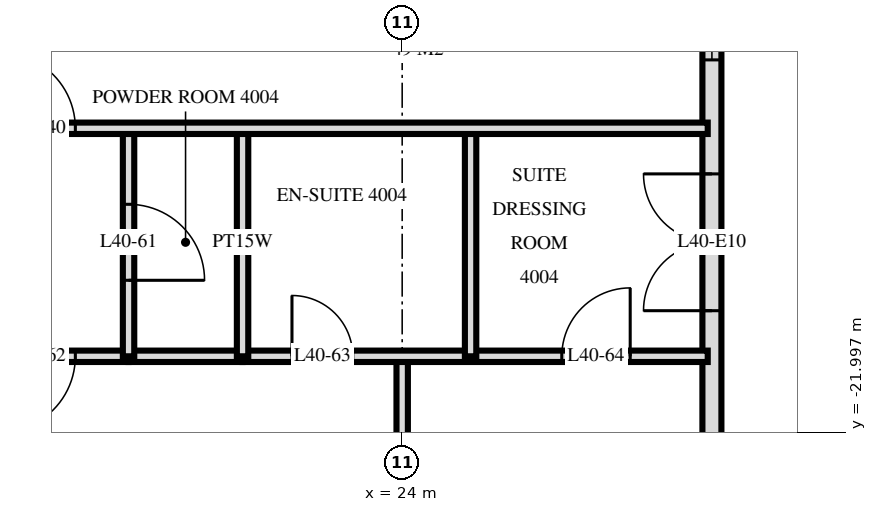
"""IFC4 building model, lengths in metres.
Left out: names, types, materials, properties, quantities, classifications, styles, units other than length and angle.
Written with IfcOpenShell. Run it as: python <this file> out.ifc"""

import sys

from ifc_helpers import new_model, si_unit, direction, frame, frame_2d, origin, place, context, subcontext, project, spatial, rectangle, extrude, element, fill, save


model = new_model("IFC4")
c1 = context("Model", 3, precision=1e-05, world=origin(), true_north=direction((0.0, 1.0)))
c2 = subcontext(c1, "Body", "Model", "MODEL_VIEW")
j1 = project(units=[si_unit("LENGTHUNIT", "METRE"), si_unit("PLANEANGLEUNIT", "RADIAN")], contexts=[c1])
p1 = place(None, origin())
s1 = spatial("IfcSite", under=j1, at=p1, CompositionType="ELEMENT")
p2 = place(p1, origin())
s2 = spatial("IfcBuilding", under=s1, at=p2, CompositionType="ELEMENT")
p3 = place(p2, frame((0.0, 0.0, 156.0)))
s3 = spatial("IfcBuildingStorey", under=s2, at=p3, CompositionType="ELEMENT", Elevation=156.0)
p4 = place(p3, frame((28.075, -29.275, 0.0), z_axis=(0.0, 0.0, 1.0), x_axis=(0.0, 1.0, 0.0)))
e1 = element("IfcWall", 1, at=p4, inside=s3, PredefinedType="SOLIDWALL", context=c2, shape_type="SweptSolid", body=[
    extrude(rectangle(XDim=25.951, YDim=0.25, at=frame_2d((12.975, 0.0))), origin(), (0.0, 0.0, 1.0), 3.32),
])
p5 = place(p4, frame((0.575, 0.0, 0.0)))
e2 = element("IfcOpeningElement", 2, at=p5, cuts=e1, PredefinedType="OPENING", context=c2, shape_type="SweptSolid", body=[
    extrude(rectangle(XDim=1.8, YDim=2.4, at=frame_2d((0.9, 1.2))), frame((0.0, 0.135, 0.0), z_axis=(0.0, -1.0, 0.0), x_axis=(1.0, 0.0, 0.0)), (0.0, 0.0, 1.0), 0.27),
])
p6 = place(p4, frame((3.325, 0.0, 0.3)))
e3 = element("IfcOpeningElement", 3, at=p6, cuts=e1, PredefinedType="OPENING", context=c2, shape_type="SweptSolid", body=[
    extrude(rectangle(XDim=1.8, YDim=2.1, at=frame_2d((0.9, 1.05))), frame((0.0, 0.135, 0.0), z_axis=(0.0, -1.0, 0.0), x_axis=(1.0, 0.0, 0.0)), (0.0, 0.0, 1.0), 0.27),
])
p7 = place(p4, frame((8.875, 0.0, 0.0)))
e4 = element("IfcOpeningElement", 4, at=p7, cuts=e1, PredefinedType="OPENING", context=c2, shape_type="SweptSolid", body=[
    extrude(rectangle(XDim=1.8, YDim=2.4, at=frame_2d((0.9, 1.2))), frame((0.0, 0.135, 0.0), z_axis=(0.0, -1.0, 0.0), x_axis=(1.0, 0.0, 0.0)), (0.0, 0.0, 1.0), 0.27),
])
p8 = place(p4, frame((12.175, 0.0, 0.3)))
e5 = element("IfcOpeningElement", 5, at=p8, cuts=e1, PredefinedType="OPENING", context=c2, shape_type="SweptSolid", body=[
    extrude(rectangle(XDim=1.2, YDim=2.1, at=frame_2d((0.6, 1.05))), frame((0.0, 0.135, 0.0), z_axis=(0.0, -1.0, 0.0), x_axis=(1.0, 0.0, 0.0)), (0.0, 0.0, 1.0), 0.27),
])
p9 = place(p4, frame((17.5, 0.0, 0.0)))
e6 = element("IfcOpeningElement", 6, at=p9, cuts=e1, PredefinedType="OPENING", context=c2, shape_type="SweptSolid", body=[
    extrude(rectangle(XDim=1.8, YDim=2.4, at=frame_2d((0.9, 1.2))), frame((0.0, 0.135, 0.0), z_axis=(0.0, -1.0, 0.0), x_axis=(1.0, 0.0, 0.0)), (0.0, 0.0, 1.0), 0.27),
])
p10 = place(p3, frame((24.9, -21.0, 0.0), z_axis=(0.0, 0.0, 1.0), x_axis=(0.0, 1.0, 0.0)))
e7 = element("IfcWall", 7, at=p10, inside=s3, PredefinedType="PARTITIONING", context=c2, shape_type="SweptSolid", body=[
    extrude(rectangle(XDim=3.0, YDim=0.15, at=frame_2d((1.5, 0.0))), origin(), (0.0, 0.0, 1.0), 3.32),
])
p11 = place(p3, frame((24.0, -33.557, 0.0), z_axis=(0.0, 0.0, 1.0), x_axis=(0.0, 1.0, 0.0)))
e8 = element("IfcWall", 8, at=p11, inside=s3, PredefinedType="PARTITIONING", context=c2, shape_type="SweptSolid", body=[
    extrude(rectangle(XDim=12.557, YDim=0.15, at=frame_2d((6.278, 0.0))), origin(), (0.0, 0.0, 1.0), 3.32),
])
p12 = place(p11, frame((5.737, 0.0, 0.0)))
e9 = element("IfcOpeningElement", 9, at=p12, cuts=e8, PredefinedType="OPENING", context=c2, shape_type="SweptSolid", body=[
    extrude(rectangle(XDim=0.9, YDim=2.1, at=frame_2d((0.45, 1.05))), frame((0.0, 0.085, 0.0), z_axis=(0.0, -1.0, 0.0), x_axis=(1.0, 0.0, 0.0)), (0.0, 0.0, 1.0), 0.17),
])
p13 = place(p3, frame((21.9, -21.0, 0.0), z_axis=(0.0, 0.0, 1.0), x_axis=(0.0, 1.0, 0.0)))
e10 = element("IfcWall", 10, at=p13, inside=s3, PredefinedType="PLUMBINGWALL", context=c2, shape_type="SweptSolid", body=[
    extrude(rectangle(XDim=3.0, YDim=0.15, at=frame_2d((1.5, 0.0))), origin(), (0.0, 0.0, 1.0), 3.32),
])
p14 = place(p3, frame((20.4, -21.0, 0.0), z_axis=(0.0, 0.0, 1.0), x_axis=(0.0, 1.0, 0.0)))
e11 = element("IfcWall", 11, at=p14, inside=s3, PredefinedType="PARTITIONING", context=c2, shape_type="SweptSolid", body=[
    extrude(rectangle(XDim=3.0, YDim=0.15, at=frame_2d((1.5, 0.0))), origin(), (0.0, 0.0, 1.0), 3.32),
])
p15 = place(p14, frame((1.0, 0.0, 0.0)))
e12 = element("IfcOpeningElement", 12, at=p15, cuts=e11, PredefinedType="OPENING", context=c2, shape_type="SweptSolid", body=[
    extrude(rectangle(XDim=1.0, YDim=2.1, at=frame_2d((0.5, 1.05))), frame((0.0, 0.085, 0.0), z_axis=(0.0, -1.0, 0.0), x_axis=(1.0, 0.0, 0.0)), (0.0, 0.0, 1.0), 0.17),
])
p16 = place(p3, frame((18.0, -21.0, 0.0), z_axis=(0.0, 0.0, 1.0), x_axis=(1.0, 0.0, 0.0)))
e13 = element("IfcWall", 13, at=p16, inside=s3, PredefinedType="PARTITIONING", context=c2, shape_type="SweptSolid", body=[
    extrude(rectangle(XDim=2.4, YDim=0.15, at=frame_2d((1.2, 0.0))), origin(), (0.0, 0.0, 1.0), 3.32),
])
p17 = place(p16, frame((0.7, 0.0, 0.0)))
e14 = element("IfcOpeningElement", 14, at=p17, cuts=e13, PredefinedType="OPENING", context=c2, shape_type="SweptSolid", body=[
    extrude(rectangle(XDim=1.0, YDim=2.1, at=frame_2d((0.5, 1.05))), frame((0.0, 0.085, 0.0), z_axis=(0.0, -1.0, 0.0), x_axis=(1.0, 0.0, 0.0)), (0.0, 0.0, 1.0), 0.17),
])
p18 = place(p3, frame((21.9, -21.0, 0.0), z_axis=(0.0, 0.0, 1.0), x_axis=(1.0, 0.0, 0.0)))
e15 = element("IfcWall", 15, at=p18, inside=s3, PredefinedType="PARTITIONING", context=c2, shape_type="SweptSolid", body=[
    extrude(rectangle(XDim=6.12, YDim=0.15, at=frame_2d((3.06, 0.0))), origin(), (0.0, 0.0, 1.0), 3.32),
])
p19 = place(p18, frame((0.65, 0.0, 0.0)))
e16 = element("IfcOpeningElement", 16, at=p19, cuts=e15, PredefinedType="OPENING", context=c2, shape_type="SweptSolid", body=[
    extrude(rectangle(XDim=0.8, YDim=2.1, at=frame_2d((0.4, 1.05))), frame((0.0, 0.085, 0.0), z_axis=(0.0, -1.0, 0.0), x_axis=(1.0, 0.0, 0.0)), (0.0, 0.0, 1.0), 0.17),
])
p20 = place(p18, frame((4.2, 0.0, 0.0)))
e17 = element("IfcOpeningElement", 17, at=p20, cuts=e15, PredefinedType="OPENING", context=c2, shape_type="SweptSolid", body=[
    extrude(rectangle(XDim=0.9, YDim=2.1, at=frame_2d((0.45, 1.05))), frame((0.0, 0.085, 0.0), z_axis=(0.0, -1.0, 0.0), x_axis=(1.0, 0.0, 0.0)), (0.0, 0.0, 1.0), 0.17),
])
p21 = place(p3, frame((20.4, -21.0, 0.0), z_axis=(0.0, 0.0, 1.0), x_axis=(1.0, 0.0, 0.0)))
e18 = element("IfcWall", 18, at=p21, inside=s3, PredefinedType="PLUMBINGWALL", context=c2, shape_type="SweptSolid", body=[
    extrude(rectangle(XDim=1.5, YDim=0.15, at=frame_2d((0.75, 0.0))), origin(), (0.0, 0.0, 1.0), 3.32),
])
p22 = place(p3, frame((-28.02, -18.0, 0.0), z_axis=(0.0, 0.0, 1.0), x_axis=(1.0, 0.0, 0.0)))
e19 = element("IfcWall", 19, at=p22, inside=s3, PredefinedType="PARTITIONING", context=c2, shape_type="SweptSolid", body=[
    extrude(rectangle(XDim=56.04, YDim=0.15, at=frame_2d((28.02, 0.0))), origin(), (0.0, 0.0, 1.0), 3.32),
])
p23 = place(p22, frame((12.52, 0.0, 0.0)))
e20 = element("IfcOpeningElement", 20, at=p23, cuts=e19, PredefinedType="OPENING", context=c2, shape_type="SweptSolid", body=[
    extrude(rectangle(XDim=1.0, YDim=2.1, at=frame_2d((0.5, 1.05))), frame((0.0, 0.085, 0.0), z_axis=(0.0, -1.0, 0.0), x_axis=(1.0, 0.0, 0.0)), (0.0, 0.0, 1.0), 0.17),
])
p24 = place(p22, frame((8.32, 0.0, 0.0)))
e21 = element("IfcOpeningElement", 21, at=p24, cuts=e19, PredefinedType="OPENING", context=c2, shape_type="SweptSolid", body=[
    extrude(rectangle(XDim=1.0, YDim=2.1, at=frame_2d((0.5, 1.05))), frame((0.0, 0.085, 0.0), z_axis=(0.0, -1.0, 0.0), x_axis=(1.0, 0.0, 0.0)), (0.0, 0.0, 1.0), 0.17),
])
p25 = place(p22, frame((40.17, 0.0, 0.0)))
e22 = element("IfcOpeningElement", 22, at=p25, cuts=e19, PredefinedType="OPENING", context=c2, shape_type="SweptSolid", body=[
    extrude(rectangle(XDim=1.0, YDim=2.1, at=frame_2d((0.5, 1.05))), frame((0.0, 0.085, 0.0), z_axis=(0.0, -1.0, 0.0), x_axis=(1.0, 0.0, 0.0)), (0.0, 0.0, 1.0), 0.17),
])
p26 = place(p22, frame((44.87, 0.0, 0.0)))
e23 = element("IfcOpeningElement", 23, at=p26, cuts=e19, PredefinedType="OPENING", context=c2, shape_type="SweptSolid", body=[
    extrude(rectangle(XDim=1.0, YDim=2.1, at=frame_2d((0.5, 1.05))), frame((0.0, 0.085, 0.0), z_axis=(0.0, -1.0, 0.0), x_axis=(1.0, 0.0, 0.0)), (0.0, 0.0, 1.0), 0.17),
])
p27 = place(p22, frame((46.72, 0.0, 0.0)))
e24 = element("IfcOpeningElement", 24, at=p27, cuts=e19, PredefinedType="OPENING", context=c2, shape_type="SweptSolid", body=[
    extrude(rectangle(XDim=1.0, YDim=2.1, at=frame_2d((0.5, 1.05))), frame((0.0, 0.085, 0.0), z_axis=(0.0, -1.0, 0.0), x_axis=(1.0, 0.0, 0.0)), (0.0, 0.0, 1.0), 0.17),
])
p28 = place(p22, frame((18.52, 0.0, 0.0)))
e25 = element("IfcOpeningElement", 25, at=p28, cuts=e19, PredefinedType="OPENING", context=c2, shape_type="SweptSolid", body=[
    extrude(rectangle(XDim=1.0, YDim=2.1, at=frame_2d((0.5, 1.05))), frame((0.0, 0.085, 0.0), z_axis=(0.0, -1.0, 0.0), x_axis=(1.0, 0.0, 0.0)), (0.0, 0.0, 1.0), 0.17),
])
p29 = place(p22, frame((24.52, 0.0, 0.0)))
e26 = element("IfcOpeningElement", 26, at=p29, cuts=e19, PredefinedType="OPENING", context=c2, shape_type="SweptSolid", body=[
    extrude(rectangle(XDim=1.0, YDim=2.1, at=frame_2d((0.5, 1.05))), frame((0.0, 0.085, 0.0), z_axis=(0.0, -1.0, 0.0), x_axis=(1.0, 0.0, 0.0)), (0.0, 0.0, 1.0), 0.17),
])
p30 = place(p22, frame((30.52, 0.0, 0.0)))
e27 = element("IfcOpeningElement", 27, at=p30, cuts=e19, PredefinedType="OPENING", context=c2, shape_type="SweptSolid", body=[
    extrude(rectangle(XDim=1.0, YDim=2.1, at=frame_2d((0.5, 1.05))), frame((0.0, 0.085, 0.0), z_axis=(0.0, -1.0, 0.0), x_axis=(1.0, 0.0, 0.0)), (0.0, 0.0, 1.0), 0.17),
])
p31 = place(p22, frame((36.52, 0.0, 0.0)))
e28 = element("IfcOpeningElement", 28, at=p31, cuts=e19, PredefinedType="OPENING", context=c2, shape_type="SweptSolid", body=[
    extrude(rectangle(XDim=1.0, YDim=2.1, at=frame_2d((0.5, 1.05))), frame((0.0, 0.085, 0.0), z_axis=(0.0, -1.0, 0.0), x_axis=(1.0, 0.0, 0.0)), (0.0, 0.0, 1.0), 0.17),
])
p32 = place(p7, origin())
e29 = element("IfcDoor", 29, at=p32, inside=s3, OperationType="DOUBLE_DOOR_SINGLE_SWING", PredefinedType="DOOR", context=c2, shape_type="SweptSolid", body=[
    extrude(rectangle(XDim=1.8, YDim=2.4, at=frame_2d((0.9, 1.2))), frame((0.0, 0.025, 0.0), z_axis=(0.0, -1.0, 0.0), x_axis=(1.0, 0.0, 0.0)), (0.0, 0.0, 1.0), 0.05),
])
fill(e4, e29)
p33 = place(p8, origin())
e30 = element("IfcWindow", 30, at=p33, inside=s3, PartitioningType="SINGLE_PANEL", PredefinedType="WINDOW", context=c2, shape_type="SweptSolid", body=[
    extrude(rectangle(XDim=1.2, YDim=2.1, at=frame_2d((0.6, 1.05))), frame((0.0, 0.03, 0.0), z_axis=(0.0, -1.0, 0.0), x_axis=(1.0, 0.0, 0.0)), (0.0, 0.0, 1.0), 0.06),
])
fill(e5, e30)
p34 = place(p27, origin())
e31 = element("IfcDoor", 31, at=p34, inside=s3, OperationType="SINGLE_SWING_RIGHT", PredefinedType="DOOR", context=c2, shape_type="SweptSolid", body=[
    extrude(rectangle(XDim=1.0, YDim=2.1, at=frame_2d((0.5, 1.05))), frame((0.0, 0.025, 0.0), z_axis=(0.0, -1.0, 0.0), x_axis=(1.0, 0.0, 0.0)), (0.0, 0.0, 1.0), 0.05),
])
fill(e24, e31)
p35 = place(p15, frame((0.5, 0.0, 0.0), z_axis=(0.0, 0.0, 1.0), x_axis=(-1.0, 0.0, 0.0)))
e32 = element("IfcDoor", 32, at=p35, inside=s3, OperationType="SINGLE_SWING_LEFT", PredefinedType="DOOR", context=c2, shape_type="SweptSolid", body=[
    extrude(rectangle(XDim=1.0, YDim=2.1, at=frame_2d((0.0, 1.05))), frame((0.0, -0.025, 0.0), z_axis=(0.0, 1.0, 0.0), x_axis=(-1.0, 0.0, 0.0)), (0.0, 0.0, 1.0), 0.05),
])
fill(e12, e32)
p36 = place(p17, frame((0.5, 0.0, 0.0), z_axis=(0.0, 0.0, 1.0), x_axis=(-1.0, 0.0, 0.0)))
e33 = element("IfcDoor", 33, at=p36, inside=s3, OperationType="SINGLE_SWING_LEFT", PredefinedType="DOOR", context=c2, shape_type="SweptSolid", body=[
    extrude(rectangle(XDim=1.0, YDim=2.1, at=frame_2d((0.0, 1.05))), frame((0.0, -0.025, 0.0), z_axis=(0.0, 1.0, 0.0), x_axis=(-1.0, 0.0, 0.0)), (0.0, 0.0, 1.0), 0.05),
])
fill(e14, e33)
p37 = place(p19, origin())
e34 = element("IfcDoor", 34, at=p37, inside=s3, OperationType="SINGLE_SWING_RIGHT", PredefinedType="DOOR", context=c2, shape_type="SweptSolid", body=[
    extrude(rectangle(XDim=0.8, YDim=2.1, at=frame_2d((0.4, 1.05))), frame((0.0, 0.025, 0.0), z_axis=(0.0, -1.0, 0.0), x_axis=(1.0, 0.0, 0.0)), (0.0, 0.0, 1.0), 0.05),
])
fill(e16, e34)
p38 = place(p20, origin())
e35 = element("IfcDoor", 35, at=p38, inside=s3, OperationType="SINGLE_SWING_LEFT", PredefinedType="DOOR", context=c2, shape_type="SweptSolid", body=[
    extrude(rectangle(XDim=0.9, YDim=2.1, at=frame_2d((0.45, 1.05))), frame((0.0, 0.025, 0.0), z_axis=(0.0, -1.0, 0.0), x_axis=(1.0, 0.0, 0.0)), (0.0, 0.0, 1.0), 0.05),
])
fill(e17, e35)
save(model, sys.argv[1])
